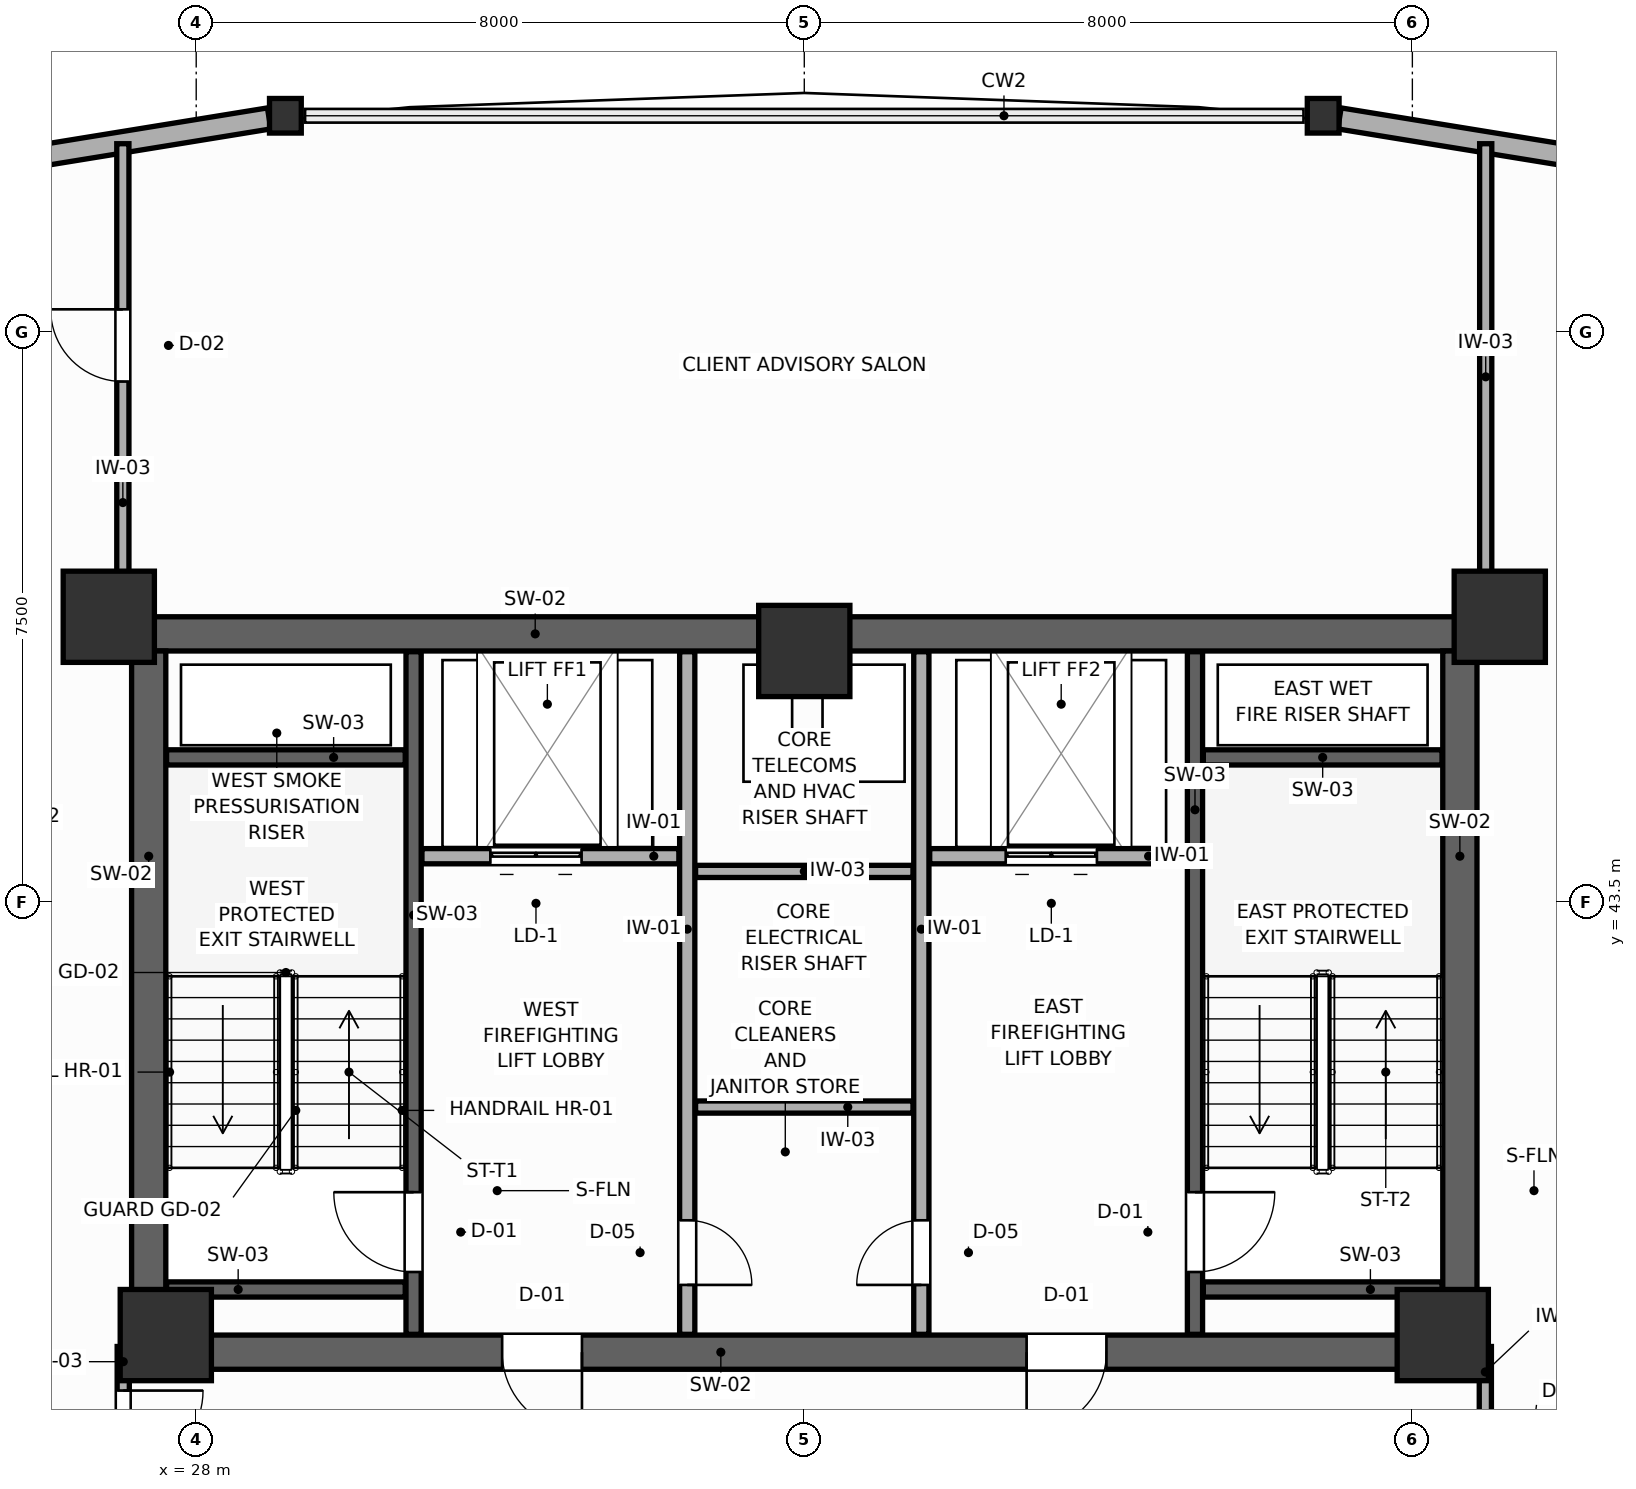
"""IFC4 building model, lengths in metres.
Left out: names, types, materials, properties, quantities, classifications, styles, units other than length and angle.
Written with IfcOpenShell. Run it as: python <this file> out.ifc"""

import sys

from ifc_helpers import new_model, si_unit, direction, frame, frame_2d, origin, origin_2d, place, context, subcontext, project, spatial, rectangle, i_section, extrude, source, transform, mapped, element, fill, save


model = new_model("IFC4")
c1 = context("Model", 3, precision=1e-05, world=origin(), true_north=direction((0.0, 1.0)))
c2 = subcontext(c1, "Body", "Model", "MODEL_VIEW")
j1 = project(units=[si_unit("LENGTHUNIT", "METRE"), si_unit("PLANEANGLEUNIT", "RADIAN")], contexts=[c1])
p1 = place(None, origin())
s1 = spatial("IfcSite", under=j1, at=p1, CompositionType="ELEMENT")
p2 = place(p1, origin())
s2 = spatial("IfcBuilding", under=s1, at=p2, CompositionType="ELEMENT")
p3 = place(p2, frame((0.0, 0.0, 120.6)))
s3 = spatial("IfcBuildingStorey", under=s2, at=p3, CompositionType="ELEMENT", Elevation=120.6)
p4 = place(p3, frame((27.15, 47.025, 0.0), z_axis=(0.0, 0.0, 1.0), x_axis=(1.0, 0.0, 0.0)))
e1 = element("IfcWall", 1, at=p4, inside=s3, PredefinedType="SHEAR", context=c2, shape_type="SweptSolid", body=[
    extrude(rectangle(XDim=17.7, YDim=0.45, at=frame_2d((8.85, 0.0))), origin(), (0.0, 0.0, 1.0), 3.6),
])
p5 = place(p3, frame((27.15, 37.575, 0.0), z_axis=(0.0, 0.0, 1.0), x_axis=(1.0, 0.0, 0.0)))
e2 = element("IfcWall", 2, at=p5, inside=s3, PredefinedType="SHEAR", context=c2, shape_type="SweptSolid", body=[
    extrude(rectangle(XDim=17.7, YDim=0.45, at=frame_2d((8.85, 0.0))), origin(), (0.0, 0.0, 1.0), 3.6),
])
p6 = place(p5, frame((4.875, 0.0, 0.0)))
e3 = element("IfcOpeningElement", 3, at=p6, cuts=e2, PredefinedType="OPENING", context=c2, shape_type="SweptSolid", body=[
    extrude(rectangle(XDim=1.05, YDim=2.1, at=frame_2d((0.525, 1.05))), frame((0.0, 0.235, 0.0), z_axis=(0.0, -1.0, 0.0), x_axis=(1.0, 0.0, 0.0)), (0.0, 0.0, 1.0), 0.47),
])
p7 = place(p5, frame((11.775, 0.0, 0.0)))
e4 = element("IfcOpeningElement", 4, at=p7, cuts=e2, PredefinedType="OPENING", context=c2, shape_type="SweptSolid", body=[
    extrude(rectangle(XDim=1.05, YDim=2.1, at=frame_2d((0.525, 1.05))), frame((0.0, 0.235, 0.0), z_axis=(0.0, -1.0, 0.0), x_axis=(1.0, 0.0, 0.0)), (0.0, 0.0, 1.0), 0.47),
])
for number, where, z_axis, x_axis in (
    (5, (27.375, 37.8, 0.0), (0.0, 0.0, 1.0), (0.0, 1.0, 0.0)),
    (6, (44.625, 37.8, 0.0), (0.0, 0.0, 1.0), (0.0, 1.0, 0.0)),
):
    element("IfcWall", number, at=place(p3, frame(where, z_axis=z_axis, x_axis=x_axis)), inside=s3, PredefinedType="SHEAR", context=c2, shape_type="SweptSolid", body=[
        extrude(rectangle(XDim=9.0, YDim=0.45, at=frame_2d((4.5, 0.0))), origin(), (0.0, 0.0, 1.0), 3.6),
    ])
m1 = source(origin(), c2, "Body", "SweptSolid", [
    extrude(rectangle(XDim=1.2, YDim=1.2, at=origin_2d()), origin(), (0.0, 0.0, 1.0), 3.6),
])
for number, where, z_axis, x_axis in (
    (7, (26.85, 47.25, 0.0), (0.0, 0.0, 1.0), (1.0, 0.0, 0.0)),
    (8, (45.15, 47.25, 0.0), (0.0, 0.0, 1.0), (1.0, 0.0, 0.0)),
    (9, (27.6, 37.8, 0.0), (0.0, 0.0, 1.0), (1.0, 0.0, 0.0)),
    (10, (44.4, 37.8, 0.0), (0.0, 0.0, 1.0), (1.0, 0.0, 0.0)),
    (11, (36.0, 46.8, 0.0), (0.0, 0.0, 1.0), (1.0, 0.0, 0.0)),
):
    element("IfcColumn", number, at=place(p3, frame(where, z_axis=z_axis, x_axis=x_axis)), inside=s3, PredefinedType="COLUMN", context=c2, shape_type="MappedRepresentation", body=[
        mapped(m1, transform((0.0, 0.0, 0.0), scale=1.0)),
    ])
m2 = source(origin(), c2, "Body", "SweptSolid", [
    extrude(i_section(OverallWidth=0.418, OverallDepth=0.455, WebThickness=0.039, FlangeThickness=0.063, FilletRadius=0.015, at=origin_2d()), origin(), (0.0, 0.0, 1.0), 3.6),
])
for number, where, z_axis, x_axis in (
    (12, (42.827, 53.841, 0.0), (0.0, 0.0, 1.0), (1.0, 0.0, 0.0)),
    (13, (29.173, 53.841, 0.0), (0.0, 0.0, 1.0), (1.0, 0.0, 0.0)),
):
    element("IfcColumn", number, at=place(p3, frame(where, z_axis=z_axis, x_axis=x_axis)), inside=s3, PredefinedType="COLUMN", context=c2, shape_type="MappedRepresentation", body=[
        mapped(m2, transform((0.0, 0.0, 0.0), scale=1.0)),
    ])
p8 = place(p3, frame((58.42, 51.306, 0.0), z_axis=(0.0, 0.0, 1.0), x_axis=(-0.987036263752, 0.160497395736, 0.0)))
e14 = element("IfcWall", 14, at=p8, inside=s3, PredefinedType="SOLIDWALL", context=c2, shape_type="SweptSolid", body=[
    extrude(rectangle(XDim=15.581, YDim=0.28, at=frame_2d((7.791, 0.0))), origin(), (0.0, 0.0, 1.0), 3.0),
])
p9 = place(p3, frame((28.959, 53.806, 0.0), z_axis=(0.0, 0.0, 1.0), x_axis=(-0.987036263752, -0.160497395736, 0.0)))
e15 = element("IfcWall", 15, at=p9, inside=s3, PredefinedType="SOLIDWALL", context=c2, shape_type="SweptSolid", body=[
    extrude(rectangle(XDim=15.581, YDim=0.28, at=frame_2d((7.791, 0.0))), origin(), (0.0, 0.0, 1.0), 2.95),
])
p10 = place(p3, frame((30.86, 37.81, 0.0), z_axis=(0.0, 0.0, 1.0), x_axis=(0.0, 1.0, 0.0)))
e16 = element("IfcWall", 16, at=p10, inside=s3, PredefinedType="SHEAR", context=c2, shape_type="SweptSolid", body=[
    extrude(rectangle(XDim=8.98, YDim=0.2, at=frame_2d((4.49, 0.0))), origin(), (0.0, 0.0, 1.0), 3.6),
])
p11 = place(p10, frame((0.82, 0.0, 0.0)))
e17 = element("IfcOpeningElement", 17, at=p11, cuts=e16, PredefinedType="OPENING", context=c2, shape_type="SweptSolid", body=[
    extrude(rectangle(XDim=1.05, YDim=2.1, at=frame_2d((0.525, 1.05))), frame((0.0, 0.11, 0.0), z_axis=(0.0, -1.0, 0.0), x_axis=(1.0, 0.0, 0.0)), (0.0, 0.0, 1.0), 0.22),
])
for number, where, z_axis, x_axis in (
    (18, (27.61, 45.4, 0.0), (0.0, 0.0, 1.0), (1.0, 0.0, 0.0)),
    (19, (27.61, 38.4, 0.0), (0.0, 0.0, 1.0), (1.0, 0.0, 0.0)),
):
    element("IfcWall", number, at=place(p3, frame(where, z_axis=z_axis, x_axis=x_axis)), inside=s3, PredefinedType="SHEAR", context=c2, shape_type="SweptSolid", body=[
        extrude(rectangle(XDim=3.14, YDim=0.2, at=frame_2d((1.57, 0.0))), origin(), (0.0, 0.0, 1.0), 3.6),
    ])
p12 = place(p3, frame((41.14, 37.81, 0.0), z_axis=(0.0, 0.0, 1.0), x_axis=(0.0, 1.0, 0.0)))
e20 = element("IfcWall", 20, at=p12, inside=s3, PredefinedType="SHEAR", context=c2, shape_type="SweptSolid", body=[
    extrude(rectangle(XDim=8.98, YDim=0.2, at=frame_2d((4.49, 0.0))), origin(), (0.0, 0.0, 1.0), 3.6),
])
p13 = place(p12, frame((0.82, 0.0, 0.0)))
e21 = element("IfcOpeningElement", 21, at=p13, cuts=e20, PredefinedType="OPENING", context=c2, shape_type="SweptSolid", body=[
    extrude(rectangle(XDim=1.05, YDim=2.1, at=frame_2d((0.525, 1.05))), frame((0.0, 0.11, 0.0), z_axis=(0.0, -1.0, 0.0), x_axis=(1.0, 0.0, 0.0)), (0.0, 0.0, 1.0), 0.22),
])
for number, where, z_axis, x_axis in (
    (22, (41.25, 45.4, 0.0), (0.0, 0.0, 1.0), (1.0, 0.0, 0.0)),
    (23, (41.25, 38.4, 0.0), (0.0, 0.0, 1.0), (1.0, 0.0, 0.0)),
):
    element("IfcWall", number, at=place(p3, frame(where, z_axis=z_axis, x_axis=x_axis)), inside=s3, PredefinedType="SHEAR", context=c2, shape_type="SweptSolid", body=[
        extrude(rectangle(XDim=3.14, YDim=0.2, at=frame_2d((1.57, 0.0))), origin(), (0.0, 0.0, 1.0), 3.6),
    ])
p14 = place(p3, frame((30.97, 44.1, 0.0), z_axis=(0.0, 0.0, 1.0), x_axis=(1.0, 0.0, 0.0)))
e24 = element("IfcWall", 24, at=p14, inside=s3, PredefinedType="PARTITIONING", context=c2, shape_type="SweptSolid", body=[
    extrude(rectangle(XDim=3.38, YDim=0.2, at=frame_2d((1.69, 0.0))), origin(), (0.0, 0.0, 1.0), 3.4),
])
p15 = place(p14, frame((0.9, 0.0, 0.0)))
e25 = element("IfcOpeningElement", 25, at=p15, cuts=e24, PredefinedType="OPENING", context=c2, shape_type="SweptSolid", body=[
    extrude(rectangle(XDim=1.2, YDim=2.1, at=frame_2d((0.6, 1.05))), frame((0.0, 0.11, 0.0), z_axis=(0.0, -1.0, 0.0), x_axis=(1.0, 0.0, 0.0)), (0.0, 0.0, 1.0), 0.22),
])
p16 = place(p3, frame((37.65, 44.1, 0.0), z_axis=(0.0, 0.0, 1.0), x_axis=(1.0, 0.0, 0.0)))
e26 = element("IfcWall", 26, at=p16, inside=s3, PredefinedType="PARTITIONING", context=c2, shape_type="SweptSolid", body=[
    extrude(rectangle(XDim=3.38, YDim=0.2, at=frame_2d((1.69, 0.0))), origin(), (0.0, 0.0, 1.0), 3.4),
])
p17 = place(p16, frame((1.0, 0.0, 0.0)))
e27 = element("IfcOpeningElement", 27, at=p17, cuts=e26, PredefinedType="OPENING", context=c2, shape_type="SweptSolid", body=[
    extrude(rectangle(XDim=1.2, YDim=2.1, at=frame_2d((0.6, 1.05))), frame((0.0, 0.11, 0.0), z_axis=(0.0, -1.0, 0.0), x_axis=(1.0, 0.0, 0.0)), (0.0, 0.0, 1.0), 0.22),
])
p18 = place(p3, frame((34.46, 37.81, 0.0), z_axis=(0.0, 0.0, 1.0), x_axis=(0.0, 1.0, 0.0)))
e28 = element("IfcWall", 28, at=p18, inside=s3, PredefinedType="PARTITIONING", context=c2, shape_type="SweptSolid", body=[
    extrude(rectangle(XDim=8.98, YDim=0.2, at=frame_2d((4.49, 0.0))), origin(), (0.0, 0.0, 1.0), 3.4),
])
p19 = place(p18, frame((0.65, 0.0, 0.0)))
e29 = element("IfcOpeningElement", 29, at=p19, cuts=e28, PredefinedType="OPENING", context=c2, shape_type="SweptSolid", body=[
    extrude(rectangle(XDim=0.85, YDim=2.05, at=frame_2d((0.425, 1.025))), frame((0.0, 0.11, 0.0), z_axis=(0.0, -1.0, 0.0), x_axis=(1.0, 0.0, 0.0)), (0.0, 0.0, 1.0), 0.22),
])
p20 = place(p3, frame((37.54, 37.81, 0.0), z_axis=(0.0, 0.0, 1.0), x_axis=(0.0, 1.0, 0.0)))
e30 = element("IfcWall", 30, at=p20, inside=s3, PredefinedType="PARTITIONING", context=c2, shape_type="SweptSolid", body=[
    extrude(rectangle(XDim=8.98, YDim=0.2, at=frame_2d((4.49, 0.0))), origin(), (0.0, 0.0, 1.0), 3.4),
])
p21 = place(p20, frame((0.65, 0.0, 0.0)))
e31 = element("IfcOpeningElement", 31, at=p21, cuts=e30, PredefinedType="OPENING", context=c2, shape_type="SweptSolid", body=[
    extrude(rectangle(XDim=0.85, YDim=2.05, at=frame_2d((0.425, 1.025))), frame((0.0, 0.11, 0.0), z_axis=(0.0, -1.0, 0.0), x_axis=(1.0, 0.0, 0.0)), (0.0, 0.0, 1.0), 0.22),
])
for number, where, z_axis, x_axis in (
    (32, (34.57, 40.8, 0.0), (0.0, 0.0, 1.0), (1.0, 0.0, 0.0)),
    (33, (34.57, 43.9, 0.0), (0.0, 0.0, 1.0), (1.0, 0.0, 0.0)),
):
    element("IfcWall", number, at=place(p3, frame(where, z_axis=z_axis, x_axis=x_axis)), inside=s3, PredefinedType="PARTITIONING", context=c2, shape_type="SweptSolid", body=[
        extrude(rectangle(XDim=2.86, YDim=0.16, at=frame_2d((1.43, 0.0))), origin(), (0.0, 0.0, 1.0), 3.4),
    ])
p22 = place(p3, frame((27.04, 35.54, 0.0), z_axis=(0.0, 0.0, 1.0), x_axis=(0.0, 1.0, 0.0)))
e34 = element("IfcWall", 34, at=p22, inside=s3, PredefinedType="PARTITIONING", context=c2, shape_type="SweptSolid", body=[
    extrude(rectangle(XDim=2.11, YDim=0.16, at=frame_2d((1.055, 0.0))), origin(), (0.0, 0.0, 1.0), 3.4),
])
p23 = place(p22, frame((0.48, 0.0, 0.0)))
e35 = element("IfcOpeningElement", 35, at=p23, cuts=e34, PredefinedType="OPENING", context=c2, shape_type="SweptSolid", body=[
    extrude(rectangle(XDim=1.05, YDim=2.1, at=frame_2d((0.525, 1.05))), frame((0.0, 0.09, 0.0), z_axis=(0.0, -1.0, 0.0), x_axis=(1.0, 0.0, 0.0)), (0.0, 0.0, 1.0), 0.18),
])
p24 = place(p3, frame((44.96, 35.0, 0.0), z_axis=(0.0, 0.0, 1.0), x_axis=(0.0, 1.0, 0.0)))
e36 = element("IfcWall", 36, at=p24, inside=s3, PredefinedType="PARTITIONING", context=c2, shape_type="SweptSolid", body=[
    extrude(rectangle(XDim=2.65, YDim=0.16, at=frame_2d((1.325, 0.0))), origin(), (0.0, 0.0, 1.0), 3.4),
])
p25 = place(p24, frame((0.75, 0.0, 0.0)))
e37 = element("IfcOpeningElement", 37, at=p25, cuts=e36, PredefinedType="OPENING", context=c2, shape_type="SweptSolid", body=[
    extrude(rectangle(XDim=1.05, YDim=2.1, at=frame_2d((0.525, 1.05))), frame((0.0, 0.09, 0.0), z_axis=(0.0, -1.0, 0.0), x_axis=(1.0, 0.0, 0.0)), (0.0, 0.0, 1.0), 0.18),
])
p26 = place(p3, frame((27.035, 47.34, 0.0), z_axis=(0.0, 0.0, 1.0), x_axis=(0.0, 1.0, 0.0)))
e38 = element("IfcWall", 38, at=p26, inside=s3, PredefinedType="PARTITIONING", context=c2, shape_type="SweptSolid", body=[
    extrude(rectangle(XDim=6.133, YDim=0.16, at=frame_2d((3.067, 0.0))), origin(), (0.0, 0.0, 1.0), 3.4),
])
p27 = place(p26, frame((3.005, 0.0, 0.0)))
e39 = element("IfcOpeningElement", 39, at=p27, cuts=e38, PredefinedType="OPENING", context=c2, shape_type="SweptSolid", body=[
    extrude(rectangle(XDim=0.95, YDim=2.05, at=frame_2d((0.475, 1.025))), frame((0.0, 0.09, 0.0), z_axis=(0.0, -1.0, 0.0), x_axis=(1.0, 0.0, 0.0)), (0.0, 0.0, 1.0), 0.18),
])
p28 = place(p3, frame((44.965, 47.34, 0.0), z_axis=(0.0, 0.0, 1.0), x_axis=(0.0, 1.0, 0.0)))
e40 = element("IfcWall", 40, at=p28, inside=s3, PredefinedType="PARTITIONING", context=c2, shape_type="SweptSolid", body=[
    extrude(rectangle(XDim=6.133, YDim=0.16, at=frame_2d((3.067, 0.0))), origin(), (0.0, 0.0, 1.0), 3.4),
])
p29 = place(p11, origin())
e41 = element("IfcDoor", 41, at=p29, inside=s3, OperationType="SINGLE_SWING_RIGHT", PredefinedType="DOOR", context=c2, shape_type="SweptSolid", body=[
    extrude(rectangle(XDim=1.05, YDim=2.1, at=frame_2d((0.525, 1.05))), frame((0.0, 0.025, 0.0), z_axis=(0.0, -1.0, 0.0), x_axis=(1.0, 0.0, 0.0)), (0.0, 0.0, 1.0), 0.05),
])
fill(e17, e41)
p30 = place(p13, frame((1.05, 0.0, 0.0), z_axis=(0.0, 0.0, 1.0), x_axis=(-1.0, 0.0, 0.0)))
e42 = element("IfcDoor", 42, at=p30, inside=s3, OperationType="SINGLE_SWING_LEFT", PredefinedType="DOOR", context=c2, shape_type="SweptSolid", body=[
    extrude(rectangle(XDim=1.05, YDim=2.1, at=frame_2d((0.525, 1.05))), frame((0.0, 0.025, 0.0), z_axis=(0.0, -1.0, 0.0), x_axis=(1.0, 0.0, 0.0)), (0.0, 0.0, 1.0), 0.05),
])
fill(e21, e42)
p31 = place(p15, origin())
e43 = element("IfcDoor", 43, at=p31, inside=s3, OperationType="DOUBLE_DOOR_SLIDING", PredefinedType="DOOR", context=c2, shape_type="SweptSolid", body=[
    extrude(rectangle(XDim=1.2, YDim=2.1, at=frame_2d((0.6, 1.05))), frame((0.0, 0.025, 0.0), z_axis=(0.0, -1.0, 0.0), x_axis=(1.0, 0.0, 0.0)), (0.0, 0.0, 1.0), 0.05),
])
fill(e25, e43)
p32 = place(p17, origin())
e44 = element("IfcDoor", 44, at=p32, inside=s3, OperationType="DOUBLE_DOOR_SLIDING", PredefinedType="DOOR", context=c2, shape_type="SweptSolid", body=[
    extrude(rectangle(XDim=1.2, YDim=2.1, at=frame_2d((0.6, 1.05))), frame((0.0, 0.025, 0.0), z_axis=(0.0, -1.0, 0.0), x_axis=(1.0, 0.0, 0.0)), (0.0, 0.0, 1.0), 0.05),
])
fill(e27, e44)
p33 = place(p19, frame((0.85, 0.0, 0.0), z_axis=(0.0, 0.0, 1.0), x_axis=(-1.0, 0.0, 0.0)))
e45 = element("IfcDoor", 45, at=p33, inside=s3, OperationType="SINGLE_SWING_RIGHT", PredefinedType="DOOR", context=c2, shape_type="SweptSolid", body=[
    extrude(rectangle(XDim=0.85, YDim=2.05, at=frame_2d((0.425, 1.025))), frame((0.0, 0.025, 0.0), z_axis=(0.0, -1.0, 0.0), x_axis=(1.0, 0.0, 0.0)), (0.0, 0.0, 1.0), 0.05),
])
fill(e29, e45)
p34 = place(p21, origin())
e46 = element("IfcDoor", 46, at=p34, inside=s3, OperationType="SINGLE_SWING_LEFT", PredefinedType="DOOR", context=c2, shape_type="SweptSolid", body=[
    extrude(rectangle(XDim=0.85, YDim=2.05, at=frame_2d((0.425, 1.025))), frame((0.0, 0.025, 0.0), z_axis=(0.0, -1.0, 0.0), x_axis=(1.0, 0.0, 0.0)), (0.0, 0.0, 1.0), 0.05),
])
fill(e31, e46)
p35 = place(p23, frame((1.05, 0.0, 0.0), z_axis=(0.0, 0.0, 1.0), x_axis=(-1.0, 0.0, 0.0)))
e47 = element("IfcDoor", 47, at=p35, inside=s3, OperationType="SINGLE_SWING_LEFT", PredefinedType="DOOR", context=c2, shape_type="SweptSolid", body=[
    extrude(rectangle(XDim=1.05, YDim=2.1, at=frame_2d((0.525, 1.05))), frame((0.0, 0.025, 0.0), z_axis=(0.0, -1.0, 0.0), x_axis=(1.0, 0.0, 0.0)), (0.0, 0.0, 1.0), 0.05),
])
fill(e35, e47)
p36 = place(p27, origin())
e48 = element("IfcDoor", 48, at=p36, inside=s3, OperationType="SINGLE_SWING_RIGHT", PredefinedType="DOOR", context=c2, shape_type="SweptSolid", body=[
    extrude(rectangle(XDim=0.95, YDim=2.05, at=frame_2d((0.475, 1.025))), frame((0.0, 0.025, 0.0), z_axis=(0.0, -1.0, 0.0), x_axis=(1.0, 0.0, 0.0)), (0.0, 0.0, 1.0), 0.05),
])
fill(e39, e48)
p37 = place(p6, frame((1.05, 0.0, 0.0), z_axis=(0.0, 0.0, 1.0), x_axis=(-1.0, 0.0, 0.0)))
e49 = element("IfcDoor", 49, at=p37, inside=s3, OperationType="SINGLE_SWING_LEFT", PredefinedType="DOOR", context=c2, shape_type="SweptSolid", body=[
    extrude(rectangle(XDim=1.05, YDim=2.1, at=frame_2d((0.525, 1.05))), frame((0.0, 0.025, 0.0), z_axis=(0.0, -1.0, 0.0), x_axis=(1.0, 0.0, 0.0)), (0.0, 0.0, 1.0), 0.05),
])
fill(e3, e49)
p38 = place(p7, frame((1.05, 0.0, 0.0), z_axis=(0.0, 0.0, 1.0), x_axis=(-1.0, 0.0, 0.0)))
e50 = element("IfcDoor", 50, at=p38, inside=s3, OperationType="SINGLE_SWING_RIGHT", PredefinedType="DOOR", context=c2, shape_type="SweptSolid", body=[
    extrude(rectangle(XDim=1.05, YDim=2.1, at=frame_2d((0.525, 1.05))), frame((0.0, 0.025, 0.0), z_axis=(0.0, -1.0, 0.0), x_axis=(1.0, 0.0, 0.0)), (0.0, 0.0, 1.0), 0.05),
])
fill(e4, e50)
save(model, sys.argv[1])
